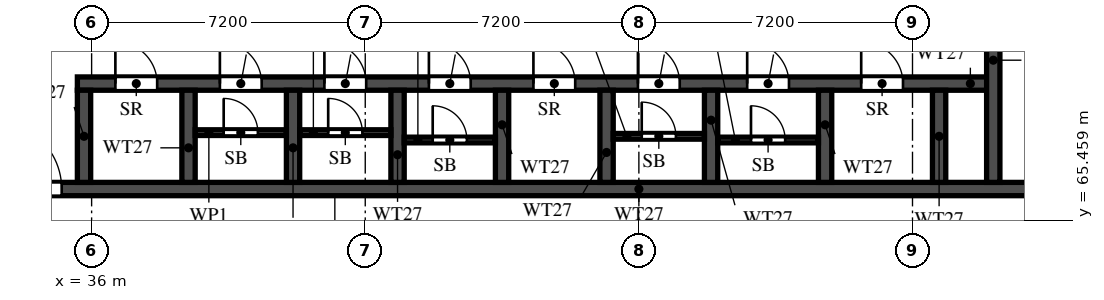
"""IFC4 building model, lengths in metres.
Left out: names, types, materials, properties, quantities, classifications, styles, units other than length and angle.
Written with IfcOpenShell. Run it as: python <this file> out.ifc"""

import sys

from ifc_helpers import new_model, si_unit, direction, frame, frame_2d, origin, place, context, subcontext, project, spatial, rectangle, extrude, element, fill, save


model = new_model("IFC4")
c1 = context("Model", 3, precision=1e-05, world=origin(), true_north=direction((0.0, 1.0)))
c2 = subcontext(c1, "Body", "Model", "MODEL_VIEW")
j1 = project(units=[si_unit("LENGTHUNIT", "METRE"), si_unit("PLANEANGLEUNIT", "RADIAN")], contexts=[c1])
p1 = place(None, origin())
s1 = spatial("IfcSite", under=j1, at=p1, CompositionType="ELEMENT")
p2 = place(p1, origin())
s2 = spatial("IfcBuilding", under=s1, at=p2, CompositionType="ELEMENT")
p3 = place(p2, frame((0.0, 0.0, 167.5)))
s3 = spatial("IfcBuildingStorey", under=s2, at=p3, CompositionType="ELEMENT", Elevation=167.5)
p4 = place(p3, frame((29.7, 66.275, 0.0), z_axis=(0.0, 0.0, 1.0), x_axis=(1.0, 0.0, 0.0)))
e1 = element("IfcWall", 1, at=p4, inside=s3, PredefinedType="SHEAR", context=c2, shape_type="SweptSolid", body=[
    extrude(rectangle(XDim=41.4, YDim=0.35, at=frame_2d((20.7, 0.0))), origin(), (0.0, 0.0, 1.0), 3.2),
])
p5 = place(p4, frame((0.925, 0.0, 0.0)))
e2 = element("IfcOpeningElement", 2, at=p5, cuts=e1, PredefinedType="OPENING", context=c2, shape_type="SweptSolid", body=[
    extrude(rectangle(XDim=1.1, YDim=2.1, at=frame_2d((0.55, 1.05))), frame((0.0, 0.185, 0.0), z_axis=(0.0, -1.0, 0.0), x_axis=(1.0, 0.0, 0.0)), (0.0, 0.0, 1.0), 0.37),
])
p6 = place(p4, frame((3.712, 0.0, 0.0)))
e3 = element("IfcOpeningElement", 3, at=p6, cuts=e1, PredefinedType="OPENING", context=c2, shape_type="SweptSolid", body=[
    extrude(rectangle(XDim=1.8, YDim=2.1, at=frame_2d((0.9, 1.05))), frame((0.0, 0.185, 0.0), z_axis=(0.0, -1.0, 0.0), x_axis=(1.0, 0.0, 0.0)), (0.0, 0.0, 1.0), 0.37),
])
p7 = place(p3, frame((35.625, 69.05, 0.0), z_axis=(0.0, 0.0, 1.0), x_axis=(1.0, 0.0, 0.0)))
e4 = element("IfcWall", 4, at=p7, inside=s3, PredefinedType="SHEAR", context=c2, shape_type="SweptSolid", body=[
    extrude(rectangle(XDim=24.1, YDim=0.35, at=frame_2d((12.05, 0.0))), origin(), (0.0, 0.0, 1.0), 3.2),
])
p8 = place(p7, frame((1.0, 0.0, 0.0)))
e5 = element("IfcOpeningElement", 5, at=p8, cuts=e4, PredefinedType="OPENING", context=c2, shape_type="SweptSolid", body=[
    extrude(rectangle(XDim=1.1, YDim=2.1, at=frame_2d((0.55, 1.05))), frame((0.0, 0.185, 0.0), z_axis=(0.0, -1.0, 0.0), x_axis=(1.0, 0.0, 0.0)), (0.0, 0.0, 1.0), 0.37),
])
p9 = place(p7, frame((3.75, 0.0, 0.0)))
e6 = element("IfcOpeningElement", 6, at=p9, cuts=e4, PredefinedType="OPENING", context=c2, shape_type="SweptSolid", body=[
    extrude(rectangle(XDim=1.1, YDim=2.1, at=frame_2d((0.55, 1.05))), frame((0.0, 0.185, 0.0), z_axis=(0.0, -1.0, 0.0), x_axis=(1.0, 0.0, 0.0)), (0.0, 0.0, 1.0), 0.37),
])
p10 = place(p7, frame((6.5, 0.0, 0.0)))
e7 = element("IfcOpeningElement", 7, at=p10, cuts=e4, PredefinedType="OPENING", context=c2, shape_type="SweptSolid", body=[
    extrude(rectangle(XDim=1.1, YDim=2.1, at=frame_2d((0.55, 1.05))), frame((0.0, 0.185, 0.0), z_axis=(0.0, -1.0, 0.0), x_axis=(1.0, 0.0, 0.0)), (0.0, 0.0, 1.0), 0.37),
])
p11 = place(p7, frame((9.25, 0.0, 0.0)))
e8 = element("IfcOpeningElement", 8, at=p11, cuts=e4, PredefinedType="OPENING", context=c2, shape_type="SweptSolid", body=[
    extrude(rectangle(XDim=1.1, YDim=2.1, at=frame_2d((0.55, 1.05))), frame((0.0, 0.185, 0.0), z_axis=(0.0, -1.0, 0.0), x_axis=(1.0, 0.0, 0.0)), (0.0, 0.0, 1.0), 0.37),
])
p12 = place(p7, frame((12.0, 0.0, 0.0)))
e9 = element("IfcOpeningElement", 9, at=p12, cuts=e4, PredefinedType="OPENING", context=c2, shape_type="SweptSolid", body=[
    extrude(rectangle(XDim=1.1, YDim=2.1, at=frame_2d((0.55, 1.05))), frame((0.0, 0.185, 0.0), z_axis=(0.0, -1.0, 0.0), x_axis=(1.0, 0.0, 0.0)), (0.0, 0.0, 1.0), 0.37),
])
p13 = place(p7, frame((14.75, 0.0, 0.0)))
e10 = element("IfcOpeningElement", 10, at=p13, cuts=e4, PredefinedType="OPENING", context=c2, shape_type="SweptSolid", body=[
    extrude(rectangle(XDim=1.1, YDim=2.1, at=frame_2d((0.55, 1.05))), frame((0.0, 0.185, 0.0), z_axis=(0.0, -1.0, 0.0), x_axis=(1.0, 0.0, 0.0)), (0.0, 0.0, 1.0), 0.37),
])
p14 = place(p7, frame((17.625, 0.0, 0.0)))
e11 = element("IfcOpeningElement", 11, at=p14, cuts=e4, PredefinedType="OPENING", context=c2, shape_type="SweptSolid", body=[
    extrude(rectangle(XDim=1.1, YDim=2.1, at=frame_2d((0.55, 1.05))), frame((0.0, 0.185, 0.0), z_axis=(0.0, -1.0, 0.0), x_axis=(1.0, 0.0, 0.0)), (0.0, 0.0, 1.0), 0.37),
])
p15 = place(p7, frame((20.625, 0.0, 0.0)))
e12 = element("IfcOpeningElement", 12, at=p15, cuts=e4, PredefinedType="OPENING", context=c2, shape_type="SweptSolid", body=[
    extrude(rectangle(XDim=1.1, YDim=2.1, at=frame_2d((0.55, 1.05))), frame((0.0, 0.185, 0.0), z_axis=(0.0, -1.0, 0.0), x_axis=(1.0, 0.0, 0.0)), (0.0, 0.0, 1.0), 0.37),
])
p16 = place(p3, frame((59.725, 66.45, 0.0), z_axis=(0.0, 0.0, 1.0), x_axis=(0.0, 1.0, 0.0)))
e13 = element("IfcWall", 13, at=p16, inside=s3, PredefinedType="SHEAR", context=c2, shape_type="SweptSolid", body=[
    extrude(rectangle(XDim=6.125, YDim=0.35, at=frame_2d((3.062, 0.0))), origin(), (0.0, 0.0, 1.0), 3.2),
])
p17 = place(p16, frame((3.85, 0.0, 0.0)))
e14 = element("IfcOpeningElement", 14, at=p17, cuts=e13, PredefinedType="OPENING", context=c2, shape_type="SweptSolid", body=[
    extrude(rectangle(XDim=1.2, YDim=2.1, at=frame_2d((0.6, 1.05))), frame((0.0, 0.185, 0.0), z_axis=(0.0, -1.0, 0.0), x_axis=(1.0, 0.0, 0.0)), (0.0, 0.0, 1.0), 0.37),
])
for number, where, z_axis, x_axis in (
    (15, (35.8, 66.45, 0.0), (0.0, 0.0, 1.0), (0.0, 1.0, 0.0)),
    (16, (38.55, 66.45, 0.0), (0.0, 0.0, 1.0), (0.0, 1.0, 0.0)),
    (17, (41.3, 66.45, 0.0), (0.0, 0.0, 1.0), (0.0, 1.0, 0.0)),
    (18, (44.05, 66.45, 0.0), (0.0, 0.0, 1.0), (0.0, 1.0, 0.0)),
    (19, (46.8, 66.45, 0.0), (0.0, 0.0, 1.0), (0.0, 1.0, 0.0)),
    (20, (49.55, 66.45, 0.0), (0.0, 0.0, 1.0), (0.0, 1.0, 0.0)),
    (21, (52.3, 66.45, 0.0), (0.0, 0.0, 1.0), (0.0, 1.0, 0.0)),
    (22, (55.3, 66.45, 0.0), (0.0, 0.0, 1.0), (0.0, 1.0, 0.0)),
    (23, (58.3, 66.45, 0.0), (0.0, 0.0, 1.0), (0.0, 1.0, 0.0)),
):
    element("IfcWall", number, at=place(p3, frame(where, z_axis=z_axis, x_axis=x_axis)), inside=s3, PredefinedType="SHEAR", context=c2, shape_type="SweptSolid", body=[
        extrude(rectangle(XDim=2.425, YDim=0.35, at=frame_2d((1.212, 0.0))), origin(), (0.0, 0.0, 1.0), 3.2),
    ])
p18 = place(p3, frame((38.725, 67.76, 0.0), z_axis=(0.0, 0.0, 1.0), x_axis=(1.0, 0.0, 0.0)))
e24 = element("IfcWall", 24, at=p18, inside=s3, PredefinedType="PARTITIONING", context=c2, shape_type="SweptSolid", body=[
    extrude(rectangle(XDim=2.4, YDim=0.15, at=frame_2d((1.2, 0.0))), origin(), (0.0, 0.0, 1.0), 3.2),
])
p19 = place(p18, frame((0.75, 0.0, 0.0)))
e25 = element("IfcOpeningElement", 25, at=p19, cuts=e24, PredefinedType="OPENING", context=c2, shape_type="SweptSolid", body=[
    extrude(rectangle(XDim=0.9, YDim=2.1, at=frame_2d((0.45, 1.05))), frame((0.0, 0.085, 0.0), z_axis=(0.0, -1.0, 0.0), x_axis=(1.0, 0.0, 0.0)), (0.0, 0.0, 1.0), 0.17),
])
p20 = place(p3, frame((41.475, 67.76, 0.0), z_axis=(0.0, 0.0, 1.0), x_axis=(1.0, 0.0, 0.0)))
e26 = element("IfcWall", 26, at=p20, inside=s3, PredefinedType="PARTITIONING", context=c2, shape_type="SweptSolid", body=[
    extrude(rectangle(XDim=2.4, YDim=0.15, at=frame_2d((1.2, 0.0))), origin(), (0.0, 0.0, 1.0), 3.2),
])
p21 = place(p20, frame((0.75, 0.0, 0.0)))
e27 = element("IfcOpeningElement", 27, at=p21, cuts=e26, PredefinedType="OPENING", context=c2, shape_type="SweptSolid", body=[
    extrude(rectangle(XDim=0.9, YDim=2.1, at=frame_2d((0.45, 1.05))), frame((0.0, 0.085, 0.0), z_axis=(0.0, -1.0, 0.0), x_axis=(1.0, 0.0, 0.0)), (0.0, 0.0, 1.0), 0.17),
])
p22 = place(p3, frame((44.225, 67.565, 0.0), z_axis=(0.0, 0.0, 1.0), x_axis=(1.0, 0.0, 0.0)))
e28 = element("IfcWall", 28, at=p22, inside=s3, PredefinedType="PARTITIONING", context=c2, shape_type="SweptSolid", body=[
    extrude(rectangle(XDim=2.4, YDim=0.15, at=frame_2d((1.2, 0.0))), origin(), (0.0, 0.0, 1.0), 3.2),
])
p23 = place(p22, frame((0.75, 0.0, 0.0)))
e29 = element("IfcOpeningElement", 29, at=p23, cuts=e28, PredefinedType="OPENING", context=c2, shape_type="SweptSolid", body=[
    extrude(rectangle(XDim=0.9, YDim=2.1, at=frame_2d((0.45, 1.05))), frame((0.0, 0.085, 0.0), z_axis=(0.0, -1.0, 0.0), x_axis=(1.0, 0.0, 0.0)), (0.0, 0.0, 1.0), 0.17),
])
p24 = place(p3, frame((49.725, 67.663, 0.0), z_axis=(0.0, 0.0, 1.0), x_axis=(1.0, 0.0, 0.0)))
e30 = element("IfcWall", 30, at=p24, inside=s3, PredefinedType="PARTITIONING", context=c2, shape_type="SweptSolid", body=[
    extrude(rectangle(XDim=2.4, YDim=0.15, at=frame_2d((1.2, 0.0))), origin(), (0.0, 0.0, 1.0), 3.2),
])
p25 = place(p24, frame((0.75, 0.0, 0.0)))
e31 = element("IfcOpeningElement", 31, at=p25, cuts=e30, PredefinedType="OPENING", context=c2, shape_type="SweptSolid", body=[
    extrude(rectangle(XDim=0.9, YDim=2.1, at=frame_2d((0.45, 1.05))), frame((0.0, 0.085, 0.0), z_axis=(0.0, -1.0, 0.0), x_axis=(1.0, 0.0, 0.0)), (0.0, 0.0, 1.0), 0.17),
])
p26 = place(p3, frame((52.475, 67.565, 0.0), z_axis=(0.0, 0.0, 1.0), x_axis=(1.0, 0.0, 0.0)))
e32 = element("IfcWall", 32, at=p26, inside=s3, PredefinedType="PARTITIONING", context=c2, shape_type="SweptSolid", body=[
    extrude(rectangle(XDim=2.65, YDim=0.15, at=frame_2d((1.325, 0.0))), origin(), (0.0, 0.0, 1.0), 3.2),
])
p27 = place(p26, frame((0.875, 0.0, 0.0)))
e33 = element("IfcOpeningElement", 33, at=p27, cuts=e32, PredefinedType="OPENING", context=c2, shape_type="SweptSolid", body=[
    extrude(rectangle(XDim=0.9, YDim=2.1, at=frame_2d((0.45, 1.05))), frame((0.0, 0.085, 0.0), z_axis=(0.0, -1.0, 0.0), x_axis=(1.0, 0.0, 0.0)), (0.0, 0.0, 1.0), 0.17),
])
p28 = place(p6, origin())
e34 = element("IfcDoor", 34, at=p28, inside=s3, OperationType="DOUBLE_DOOR_SINGLE_SWING", PredefinedType="DOOR", context=c2, shape_type="SweptSolid", body=[
    extrude(rectangle(XDim=1.8, YDim=2.1, at=frame_2d((0.9, 1.05))), frame((0.0, 0.025, 0.0), z_axis=(0.0, -1.0, 0.0), x_axis=(1.0, 0.0, 0.0)), (0.0, 0.0, 1.0), 0.05),
])
fill(e3, e34)
p29 = place(p8, origin())
e35 = element("IfcDoor", 35, at=p29, inside=s3, OperationType="SINGLE_SWING_RIGHT", PredefinedType="DOOR", context=c2, shape_type="SweptSolid", body=[
    extrude(rectangle(XDim=1.1, YDim=2.1, at=frame_2d((0.55, 1.05))), frame((0.0, 0.025, 0.0), z_axis=(0.0, -1.0, 0.0), x_axis=(1.0, 0.0, 0.0)), (0.0, 0.0, 1.0), 0.05),
])
fill(e5, e35)
p30 = place(p9, origin())
e36 = element("IfcDoor", 36, at=p30, inside=s3, OperationType="SINGLE_SWING_LEFT", PredefinedType="DOOR", context=c2, shape_type="SweptSolid", body=[
    extrude(rectangle(XDim=1.1, YDim=2.1, at=frame_2d((0.55, 1.05))), frame((0.0, 0.025, 0.0), z_axis=(0.0, -1.0, 0.0), x_axis=(1.0, 0.0, 0.0)), (0.0, 0.0, 1.0), 0.05),
])
fill(e6, e36)
p31 = place(p19, origin())
e37 = element("IfcDoor", 37, at=p31, inside=s3, OperationType="SINGLE_SWING_RIGHT", PredefinedType="DOOR", context=c2, shape_type="SweptSolid", body=[
    extrude(rectangle(XDim=0.9, YDim=2.1, at=frame_2d((0.45, 1.05))), frame((0.0, 0.025, 0.0), z_axis=(0.0, -1.0, 0.0), x_axis=(1.0, 0.0, 0.0)), (0.0, 0.0, 1.0), 0.05),
])
fill(e25, e37)
p32 = place(p10, origin())
e38 = element("IfcDoor", 38, at=p32, inside=s3, OperationType="SINGLE_SWING_RIGHT", PredefinedType="DOOR", context=c2, shape_type="SweptSolid", body=[
    extrude(rectangle(XDim=1.1, YDim=2.1, at=frame_2d((0.55, 1.05))), frame((0.0, 0.025, 0.0), z_axis=(0.0, -1.0, 0.0), x_axis=(1.0, 0.0, 0.0)), (0.0, 0.0, 1.0), 0.05),
])
fill(e7, e38)
p33 = place(p21, origin())
e39 = element("IfcDoor", 39, at=p33, inside=s3, OperationType="SINGLE_SWING_LEFT", PredefinedType="DOOR", context=c2, shape_type="SweptSolid", body=[
    extrude(rectangle(XDim=0.9, YDim=2.1, at=frame_2d((0.45, 1.05))), frame((0.0, 0.025, 0.0), z_axis=(0.0, -1.0, 0.0), x_axis=(1.0, 0.0, 0.0)), (0.0, 0.0, 1.0), 0.05),
])
fill(e27, e39)
p34 = place(p11, origin())
e40 = element("IfcDoor", 40, at=p34, inside=s3, OperationType="SINGLE_SWING_LEFT", PredefinedType="DOOR", context=c2, shape_type="SweptSolid", body=[
    extrude(rectangle(XDim=1.1, YDim=2.1, at=frame_2d((0.55, 1.05))), frame((0.0, 0.025, 0.0), z_axis=(0.0, -1.0, 0.0), x_axis=(1.0, 0.0, 0.0)), (0.0, 0.0, 1.0), 0.05),
])
fill(e8, e40)
p35 = place(p23, origin())
e41 = element("IfcDoor", 41, at=p35, inside=s3, OperationType="SINGLE_SWING_LEFT", PredefinedType="DOOR", context=c2, shape_type="SweptSolid", body=[
    extrude(rectangle(XDim=0.9, YDim=2.1, at=frame_2d((0.45, 1.05))), frame((0.0, 0.025, 0.0), z_axis=(0.0, -1.0, 0.0), x_axis=(1.0, 0.0, 0.0)), (0.0, 0.0, 1.0), 0.05),
])
fill(e29, e41)
p36 = place(p12, origin())
e42 = element("IfcDoor", 42, at=p36, inside=s3, OperationType="SINGLE_SWING_RIGHT", PredefinedType="DOOR", context=c2, shape_type="SweptSolid", body=[
    extrude(rectangle(XDim=1.1, YDim=2.1, at=frame_2d((0.55, 1.05))), frame((0.0, 0.025, 0.0), z_axis=(0.0, -1.0, 0.0), x_axis=(1.0, 0.0, 0.0)), (0.0, 0.0, 1.0), 0.05),
])
fill(e9, e42)
p37 = place(p13, origin())
e43 = element("IfcDoor", 43, at=p37, inside=s3, OperationType="SINGLE_SWING_LEFT", PredefinedType="DOOR", context=c2, shape_type="SweptSolid", body=[
    extrude(rectangle(XDim=1.1, YDim=2.1, at=frame_2d((0.55, 1.05))), frame((0.0, 0.025, 0.0), z_axis=(0.0, -1.0, 0.0), x_axis=(1.0, 0.0, 0.0)), (0.0, 0.0, 1.0), 0.05),
])
fill(e10, e43)
p38 = place(p25, origin())
e44 = element("IfcDoor", 44, at=p38, inside=s3, OperationType="SINGLE_SWING_LEFT", PredefinedType="DOOR", context=c2, shape_type="SweptSolid", body=[
    extrude(rectangle(XDim=0.9, YDim=2.1, at=frame_2d((0.45, 1.05))), frame((0.0, 0.025, 0.0), z_axis=(0.0, -1.0, 0.0), x_axis=(1.0, 0.0, 0.0)), (0.0, 0.0, 1.0), 0.05),
])
fill(e31, e44)
p39 = place(p14, origin())
e45 = element("IfcDoor", 45, at=p39, inside=s3, OperationType="SINGLE_SWING_RIGHT", PredefinedType="DOOR", context=c2, shape_type="SweptSolid", body=[
    extrude(rectangle(XDim=1.1, YDim=2.1, at=frame_2d((0.55, 1.05))), frame((0.0, 0.025, 0.0), z_axis=(0.0, -1.0, 0.0), x_axis=(1.0, 0.0, 0.0)), (0.0, 0.0, 1.0), 0.05),
])
fill(e11, e45)
p40 = place(p27, origin())
e46 = element("IfcDoor", 46, at=p40, inside=s3, OperationType="SINGLE_SWING_RIGHT", PredefinedType="DOOR", context=c2, shape_type="SweptSolid", body=[
    extrude(rectangle(XDim=0.9, YDim=2.1, at=frame_2d((0.45, 1.05))), frame((0.0, 0.025, 0.0), z_axis=(0.0, -1.0, 0.0), x_axis=(1.0, 0.0, 0.0)), (0.0, 0.0, 1.0), 0.05),
])
fill(e33, e46)
p41 = place(p15, origin())
e47 = element("IfcDoor", 47, at=p41, inside=s3, OperationType="SINGLE_SWING_RIGHT", PredefinedType="DOOR", context=c2, shape_type="SweptSolid", body=[
    extrude(rectangle(XDim=1.1, YDim=2.1, at=frame_2d((0.55, 1.05))), frame((0.0, 0.025, 0.0), z_axis=(0.0, -1.0, 0.0), x_axis=(1.0, 0.0, 0.0)), (0.0, 0.0, 1.0), 0.05),
])
fill(e12, e47)
save(model, sys.argv[1])
